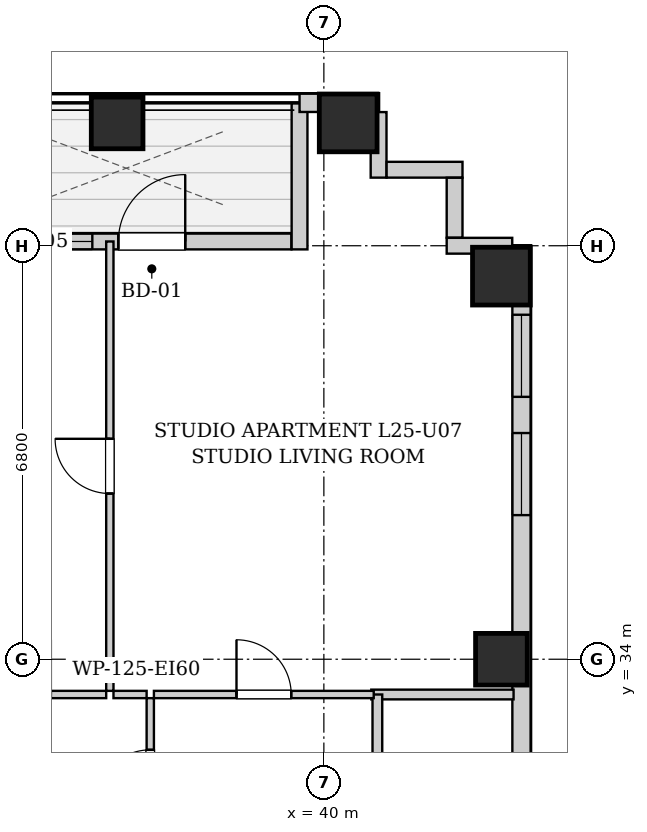
"""IFC4 building model, lengths in metres.
Left out: names, types, materials, properties, quantities, classifications, styles, units other than length and angle.
Written with IfcOpenShell. Run it as: python <this file> out.ifc"""

import sys

from ifc_helpers import new_model, si_unit, direction, frame, frame_2d, origin, origin_2d, place, context, subcontext, project, spatial, rectangle, extrude, element, fill, save


model = new_model("IFC4")
c1 = context("Model", 3, precision=1e-05, world=origin(), true_north=direction((0.0, 1.0)))
c2 = subcontext(c1, "Body", "Model", "MODEL_VIEW")
j1 = project(units=[si_unit("LENGTHUNIT", "METRE"), si_unit("PLANEANGLEUNIT", "RADIAN")], contexts=[c1])
p1 = place(None, origin())
s1 = spatial("IfcSite", under=j1, at=p1, CompositionType="ELEMENT")
p2 = place(p1, origin())
s2 = spatial("IfcBuilding", under=s1, at=p2, CompositionType="ELEMENT")
p3 = place(p2, frame((0.0, 0.0, 91.1)))
s3 = spatial("IfcBuildingStorey", under=s2, at=p3, CompositionType="ELEMENT", Elevation=91.1)
p4 = place(p3, frame((36.6, 42.82, 0.0), z_axis=(0.0, 0.0, 1.0), x_axis=(1.0, 0.0, 0.0)))
e1 = element("IfcColumn", 1, at=p4, inside=s3, PredefinedType="COLUMN", context=c2, shape_type="SweptSolid", body=[
    extrude(rectangle(XDim=0.85, YDim=0.85, at=origin_2d()), origin(), (0.0, 0.0, 1.0), 3.2),
])
p5 = place(p3, frame((40.4, 42.82, 0.0), z_axis=(0.0, 0.0, 1.0), x_axis=(1.0, 0.0, 0.0)))
e2 = element("IfcColumn", 2, at=p5, inside=s3, PredefinedType="COLUMN", context=c2, shape_type="SweptSolid", body=[
    extrude(rectangle(XDim=0.95, YDim=0.95, at=origin_2d()), origin(), (0.0, 0.0, 1.0), 3.2),
])
p6 = place(p3, frame((42.92, 34.0, 0.0), z_axis=(0.0, 0.0, 1.0), x_axis=(1.0, 0.0, 0.0)))
e3 = element("IfcColumn", 3, at=p6, inside=s3, PredefinedType="COLUMN", context=c2, shape_type="SweptSolid", body=[
    extrude(rectangle(XDim=0.85, YDim=0.85, at=origin_2d()), origin(), (0.0, 0.0, 1.0), 3.2),
])
p7 = place(p3, frame((42.92, 40.3, 0.0), z_axis=(0.0, 0.0, 1.0), x_axis=(1.0, 0.0, 0.0)))
e4 = element("IfcColumn", 4, at=p7, inside=s3, PredefinedType="COLUMN", context=c2, shape_type="SweptSolid", body=[
    extrude(rectangle(XDim=0.95, YDim=0.95, at=origin_2d()), origin(), (0.0, 0.0, 1.0), 3.2),
])
p8 = place(p3, frame((34.034, 40.87, 0.0), z_axis=(0.0, 0.0, 1.0), x_axis=(1.0, 0.0, 0.0)))
e5 = element("IfcWall", 5, at=p8, inside=s3, PredefinedType="SOLIDWALL", context=c2, shape_type="SweptSolid", body=[
    extrude(rectangle(XDim=5.432, YDim=0.26, at=frame_2d((2.716, 0.0))), origin(), (0.0, 0.0, 1.0), 2.94),
])
p9 = place(p8, frame((2.586, 0.0, 0.0)))
e6 = element("IfcOpeningElement", 6, at=p9, cuts=e5, PredefinedType="OPENING", context=c2, shape_type="SweptSolid", body=[
    extrude(rectangle(XDim=1.1, YDim=2.0, at=frame_2d((0.55, 1.0))), frame((0.0, 0.14, 0.0), z_axis=(0.0, -1.0, 0.0), x_axis=(1.0, 0.0, 0.0)), (0.0, 0.0, 1.0), 0.28),
])
p10 = place(p8, frame((0.558, 0.0, 0.85)))
e7 = element("IfcOpeningElement", 7, at=p10, cuts=e5, PredefinedType="OPENING", context=c2, shape_type="SweptSolid", body=[
    extrude(rectangle(XDim=1.6, YDim=1.65, at=frame_2d((0.8, 0.825))), frame((0.0, 0.14, 0.0), z_axis=(0.0, -1.0, 0.0), x_axis=(1.0, 0.0, 0.0)), (0.0, 0.0, 1.0), 0.28),
])
p11 = place(p3, frame((39.6, 40.74, 0.0), z_axis=(0.0, 0.0, 1.0), x_axis=(0.0, 1.0, 0.0)))
e8 = element("IfcWall", 8, at=p11, inside=s3, PredefinedType="SOLIDWALL", context=c2, shape_type="SweptSolid", body=[
    extrude(rectangle(XDim=2.4, YDim=0.26, at=frame_2d((1.2, 0.0))), origin(), (0.0, 0.0, 1.0), 2.94),
])
p12 = place(p3, frame((39.6, 43.15, 0.0), z_axis=(0.0, 0.0, 1.0), x_axis=(1.0, 0.0, 0.0)))
e9 = element("IfcWall", 9, at=p12, inside=s3, PredefinedType="SOLIDWALL", context=c2, shape_type="SweptSolid", body=[
    extrude(rectangle(XDim=1.3, YDim=0.3, at=frame_2d((0.65, 0.0))), origin(), (0.0, 0.0, 1.0), 2.94),
])
p13 = place(p3, frame((43.25, 40.8, 0.0), z_axis=(0.0, 0.0, 1.0), x_axis=(0.0, -1.0, 0.0)))
e10 = element("IfcWall", 10, at=p13, inside=s3, PredefinedType="SOLIDWALL", context=c2, shape_type="SweptSolid", body=[
    extrude(rectangle(XDim=38.3, YDim=0.3, at=frame_2d((19.15, 0.0))), origin(), (0.0, 0.0, 1.0), 2.94),
])
p14 = place(p13, frame((33.495, 0.0, 0.55)))
e11 = element("IfcOpeningElement", 11, at=p14, cuts=e10, PredefinedType="OPENING", context=c2, shape_type="SweptSolid", body=[
    extrude(rectangle(XDim=1.35, YDim=1.2, at=frame_2d((0.675, 0.6))), frame((0.0, 0.16, 0.0), z_axis=(0.0, -1.0, 0.0), x_axis=(1.0, 0.0, 0.0)), (0.0, 0.0, 1.0), 0.32),
])
p15 = place(p13, frame((31.785, 0.0, 0.55)))
e12 = element("IfcOpeningElement", 12, at=p15, cuts=e10, PredefinedType="OPENING", context=c2, shape_type="SweptSolid", body=[
    extrude(rectangle(XDim=1.35, YDim=1.2, at=frame_2d((0.675, 0.6))), frame((0.0, 0.16, 0.0), z_axis=(0.0, -1.0, 0.0), x_axis=(1.0, 0.0, 0.0)), (0.0, 0.0, 1.0), 0.32),
])
p16 = place(p13, frame((3.08, 0.0, 0.55)))
e13 = element("IfcOpeningElement", 13, at=p16, cuts=e10, PredefinedType="OPENING", context=c2, shape_type="SweptSolid", body=[
    extrude(rectangle(XDim=1.35, YDim=1.2, at=frame_2d((0.675, 0.6))), frame((0.0, 0.16, 0.0), z_axis=(0.0, -1.0, 0.0), x_axis=(1.0, 0.0, 0.0)), (0.0, 0.0, 1.0), 0.32),
])
p17 = place(p13, frame((1.135, 0.0, 0.55)))
e14 = element("IfcOpeningElement", 14, at=p17, cuts=e10, PredefinedType="OPENING", context=c2, shape_type="SweptSolid", body=[
    extrude(rectangle(XDim=1.35, YDim=1.2, at=frame_2d((0.675, 0.6))), frame((0.0, 0.16, 0.0), z_axis=(0.0, -1.0, 0.0), x_axis=(1.0, 0.0, 0.0)), (0.0, 0.0, 1.0), 0.32),
])
p18 = place(p13, frame((21.93, 0.0, 0.55)))
e15 = element("IfcOpeningElement", 15, at=p18, cuts=e10, PredefinedType="OPENING", context=c2, shape_type="SweptSolid", body=[
    extrude(rectangle(XDim=1.35, YDim=1.2, at=frame_2d((0.675, 0.6))), frame((0.0, 0.16, 0.0), z_axis=(0.0, -1.0, 0.0), x_axis=(1.0, 0.0, 0.0)), (0.0, 0.0, 1.0), 0.32),
])
p19 = place(p13, frame((23.54, 0.0, 0.55)))
e16 = element("IfcOpeningElement", 16, at=p19, cuts=e10, PredefinedType="OPENING", context=c2, shape_type="SweptSolid", body=[
    extrude(rectangle(XDim=1.35, YDim=1.2, at=frame_2d((0.675, 0.6))), frame((0.0, 0.16, 0.0), z_axis=(0.0, -1.0, 0.0), x_axis=(1.0, 0.0, 0.0)), (0.0, 0.0, 1.0), 0.32),
])
p20 = place(p13, frame((14.95, 0.0, 0.55)))
e17 = element("IfcOpeningElement", 17, at=p20, cuts=e10, PredefinedType="OPENING", context=c2, shape_type="SweptSolid", body=[
    extrude(rectangle(XDim=1.35, YDim=1.2, at=frame_2d((0.675, 0.6))), frame((0.0, 0.16, 0.0), z_axis=(0.0, -1.0, 0.0), x_axis=(1.0, 0.0, 0.0)), (0.0, 0.0, 1.0), 0.32),
])
p21 = place(p13, frame((12.385, 0.0, 0.55)))
e18 = element("IfcOpeningElement", 18, at=p21, cuts=e10, PredefinedType="OPENING", context=c2, shape_type="SweptSolid", body=[
    extrude(rectangle(XDim=1.35, YDim=1.2, at=frame_2d((0.675, 0.6))), frame((0.0, 0.16, 0.0), z_axis=(0.0, -1.0, 0.0), x_axis=(1.0, 0.0, 0.0)), (0.0, 0.0, 1.0), 0.32),
])
p22 = place(p3, frame((40.9, 42.998, 0.0), z_axis=(0.0, 0.0, 1.0), x_axis=(0.0, -1.0, 0.0)))
e19 = element("IfcWall", 19, at=p22, inside=s3, PredefinedType="SOLIDWALL", context=c2, shape_type="SweptSolid", body=[
    extrude(rectangle(XDim=1.078, YDim=0.26, at=frame_2d((0.539, 0.0))), origin(), (0.0, 0.0, 1.0), 2.94),
])
p23 = place(p3, frame((41.032, 42.05, 0.0), z_axis=(0.0, 0.0, 1.0), x_axis=(1.0, 0.0, 0.0)))
e20 = element("IfcWall", 20, at=p23, inside=s3, PredefinedType="SOLIDWALL", context=c2, shape_type="SweptSolid", body=[
    extrude(rectangle(XDim=1.248, YDim=0.26, at=frame_2d((0.624, 0.0))), origin(), (0.0, 0.0, 1.0), 2.94),
])
p24 = place(p3, frame((42.15, 41.918, 0.0), z_axis=(0.0, 0.0, 1.0), x_axis=(0.0, -1.0, 0.0)))
e21 = element("IfcWall", 21, at=p24, inside=s3, PredefinedType="SOLIDWALL", context=c2, shape_type="SweptSolid", body=[
    extrude(rectangle(XDim=0.986, YDim=0.26, at=frame_2d((0.493, 0.0))), origin(), (0.0, 0.0, 1.0), 2.94),
])
p25 = place(p3, frame((42.02, 40.8, 0.0), z_axis=(0.0, 0.0, 1.0), x_axis=(1.0, 0.0, 0.0)))
e22 = element("IfcWall", 22, at=p25, inside=s3, PredefinedType="SOLIDWALL", context=c2, shape_type="SweptSolid", body=[
    extrude(rectangle(XDim=1.078, YDim=0.26, at=frame_2d((0.539, 0.0))), origin(), (0.0, 0.0, 1.0), 2.94),
])
p26 = place(p3, frame((40.78, 33.42, 0.0), z_axis=(0.0, 0.0, 1.0), x_axis=(1.0, 0.0, 0.0)))
e23 = element("IfcWall", 23, at=p26, inside=s3, PredefinedType="PARTITIONING", context=c2, shape_type="SweptSolid", body=[
    extrude(rectangle(XDim=2.34, YDim=0.16, at=frame_2d((1.17, 0.0))), origin(), (0.0, 0.0, 1.0), 2.94),
])
p27 = place(p3, frame((40.88, 30.76, 0.0), z_axis=(0.0, 0.0, 1.0), x_axis=(0.0, 1.0, 0.0)))
e24 = element("IfcWall", 24, at=p27, inside=s3, PredefinedType="PARTITIONING", context=c2, shape_type="SweptSolid", body=[
    extrude(rectangle(XDim=2.66, YDim=0.16, at=frame_2d((1.33, 0.0))), origin(), (0.0, 0.0, 1.0), 2.94),
])
p28 = place(p3, frame((37.145, 30.76, 0.0), z_axis=(0.0, 0.0, 1.0), x_axis=(0.0, 1.0, 0.0)))
e25 = element("IfcWall", 25, at=p28, inside=s3, PredefinedType="PARTITIONING", context=c2, shape_type="SweptSolid", body=[
    extrude(rectangle(XDim=2.6, YDim=0.12, at=frame_2d((1.3, 0.0))), origin(), (0.0, 0.0, 1.0), 2.94),
])
p29 = place(p28, frame((0.85, 0.0, 0.0)))
e26 = element("IfcOpeningElement", 26, at=p29, cuts=e25, PredefinedType="OPENING", context=c2, shape_type="SweptSolid", body=[
    extrude(rectangle(XDim=0.9, YDim=2.05, at=frame_2d((0.45, 1.025))), frame((0.0, 0.07, 0.0), z_axis=(0.0, -1.0, 0.0), x_axis=(1.0, 0.0, 0.0)), (0.0, 0.0, 1.0), 0.14),
])
p30 = place(p3, frame((33.7, 33.42, 0.0), z_axis=(0.0, 0.0, 1.0), x_axis=(1.0, 0.0, 0.0)))
e27 = element("IfcWall", 27, at=p30, inside=s3, PredefinedType="PARTITIONING", context=c2, shape_type="SweptSolid", body=[
    extrude(rectangle(XDim=2.72, YDim=0.12, at=frame_2d((1.36, 0.0))), origin(), (0.0, 0.0, 1.0), 2.94),
])
p31 = place(p30, frame((0.91, 0.0, 0.0)))
e28 = element("IfcOpeningElement", 28, at=p31, cuts=e27, PredefinedType="OPENING", context=c2, shape_type="SweptSolid", body=[
    extrude(rectangle(XDim=0.9, YDim=2.05, at=frame_2d((0.45, 1.025))), frame((0.0, 0.07, 0.0), z_axis=(0.0, -1.0, 0.0), x_axis=(1.0, 0.0, 0.0)), (0.0, 0.0, 1.0), 0.14),
])
p32 = place(p3, frame((36.54, 33.42, 0.0), z_axis=(0.0, 0.0, 1.0), x_axis=(1.0, 0.0, 0.0)))
e29 = element("IfcWall", 29, at=p32, inside=s3, PredefinedType="PARTITIONING", context=c2, shape_type="SweptSolid", body=[
    extrude(rectangle(XDim=0.545, YDim=0.12, at=frame_2d((0.272, 0.0))), origin(), (0.0, 0.0, 1.0), 2.94),
])
p33 = place(p3, frame((37.205, 33.42, 0.0), z_axis=(0.0, 0.0, 1.0), x_axis=(1.0, 0.0, 0.0)))
e30 = element("IfcWall", 30, at=p33, inside=s3, PredefinedType="PARTITIONING", context=c2, shape_type="SweptSolid", body=[
    extrude(rectangle(XDim=3.615, YDim=0.12, at=frame_2d((1.808, 0.0))), origin(), (0.0, 0.0, 1.0), 2.94),
])
p34 = place(p33, frame((1.358, 0.0, 0.0)))
e31 = element("IfcOpeningElement", 31, at=p34, cuts=e30, PredefinedType="OPENING", context=c2, shape_type="SweptSolid", body=[
    extrude(rectangle(XDim=0.9, YDim=2.05, at=frame_2d((0.45, 1.025))), frame((0.0, 0.07, 0.0), z_axis=(0.0, -1.0, 0.0), x_axis=(1.0, 0.0, 0.0)), (0.0, 0.0, 1.0), 0.14),
])
p35 = place(p3, frame((36.48, 33.48, 0.0), z_axis=(0.0, 0.0, 1.0), x_axis=(0.0, 1.0, 0.0)))
e32 = element("IfcWall", 32, at=p35, inside=s3, PredefinedType="PARTITIONING", context=c2, shape_type="SweptSolid", body=[
    extrude(rectangle(XDim=7.39, YDim=0.12, at=frame_2d((3.695, 0.0))), origin(), (0.0, 0.0, 1.0), 2.94),
])
p36 = place(p35, frame((3.245, 0.0, 0.0)))
e33 = element("IfcOpeningElement", 33, at=p36, cuts=e32, PredefinedType="OPENING", context=c2, shape_type="SweptSolid", body=[
    extrude(rectangle(XDim=0.9, YDim=2.05, at=frame_2d((0.45, 1.025))), frame((0.0, 0.07, 0.0), z_axis=(0.0, -1.0, 0.0), x_axis=(1.0, 0.0, 0.0)), (0.0, 0.0, 1.0), 0.14),
])
p37 = place(p29, origin())
e34 = element("IfcDoor", 34, at=p37, inside=s3, OperationType="SINGLE_SWING_LEFT", PredefinedType="DOOR", context=c2, shape_type="SweptSolid", body=[
    extrude(rectangle(XDim=0.9, YDim=2.05, at=frame_2d((0.45, 1.025))), frame((0.0, 0.025, 0.0), z_axis=(0.0, -1.0, 0.0), x_axis=(1.0, 0.0, 0.0)), (0.0, 0.0, 1.0), 0.05),
])
fill(e26, e34)
p38 = place(p34, origin())
e35 = element("IfcDoor", 35, at=p38, inside=s3, OperationType="SINGLE_SWING_LEFT", PredefinedType="DOOR", context=c2, shape_type="SweptSolid", body=[
    extrude(rectangle(XDim=0.9, YDim=2.05, at=frame_2d((0.45, 1.025))), frame((0.0, 0.025, 0.0), z_axis=(0.0, -1.0, 0.0), x_axis=(1.0, 0.0, 0.0)), (0.0, 0.0, 1.0), 0.05),
])
fill(e31, e35)
p39 = place(p36, origin())
e36 = element("IfcDoor", 36, at=p39, inside=s3, OperationType="SINGLE_SWING_RIGHT", PredefinedType="DOOR", context=c2, shape_type="SweptSolid", body=[
    extrude(rectangle(XDim=0.9, YDim=2.05, at=frame_2d((0.45, 1.025))), frame((0.0, 0.025, 0.0), z_axis=(0.0, -1.0, 0.0), x_axis=(1.0, 0.0, 0.0)), (0.0, 0.0, 1.0), 0.05),
])
fill(e33, e36)
p40 = place(p9, origin())
e37 = element("IfcDoor", 37, at=p40, inside=s3, OperationType="SINGLE_SWING_RIGHT", PredefinedType="DOOR", context=c2, shape_type="SweptSolid", body=[
    extrude(rectangle(XDim=1.1, YDim=2.0, at=frame_2d((0.55, 1.0))), frame((0.0, 0.025, 0.0), z_axis=(0.0, -1.0, 0.0), x_axis=(1.0, 0.0, 0.0)), (0.0, 0.0, 1.0), 0.05),
])
fill(e6, e37)
p41 = place(p10, origin())
e38 = element("IfcWindow", 38, at=p41, inside=s3, PartitioningType="DOUBLE_PANEL_VERTICAL", PredefinedType="WINDOW", context=c2, shape_type="SweptSolid", body=[
    extrude(rectangle(XDim=1.6, YDim=1.65, at=frame_2d((0.8, 0.825))), frame((0.0, 0.03, 0.0), z_axis=(0.0, -1.0, 0.0), x_axis=(1.0, 0.0, 0.0)), (0.0, 0.0, 1.0), 0.06),
])
fill(e7, e38)
p42 = place(p16, origin())
e39 = element("IfcWindow", 39, at=p42, inside=s3, PartitioningType="SINGLE_PANEL", PredefinedType="WINDOW", context=c2, shape_type="SweptSolid", body=[
    extrude(rectangle(XDim=1.35, YDim=1.2, at=frame_2d((0.675, 0.6))), frame((0.0, 0.03, 0.0), z_axis=(0.0, -1.0, 0.0), x_axis=(1.0, 0.0, 0.0)), (0.0, 0.0, 1.0), 0.06),
])
fill(e13, e39)
p43 = place(p17, origin())
e40 = element("IfcWindow", 40, at=p43, inside=s3, PartitioningType="SINGLE_PANEL", PredefinedType="WINDOW", context=c2, shape_type="SweptSolid", body=[
    extrude(rectangle(XDim=1.35, YDim=1.2, at=frame_2d((0.675, 0.6))), frame((0.0, 0.03, 0.0), z_axis=(0.0, -1.0, 0.0), x_axis=(1.0, 0.0, 0.0)), (0.0, 0.0, 1.0), 0.06),
])
fill(e14, e40)
save(model, sys.argv[1])
